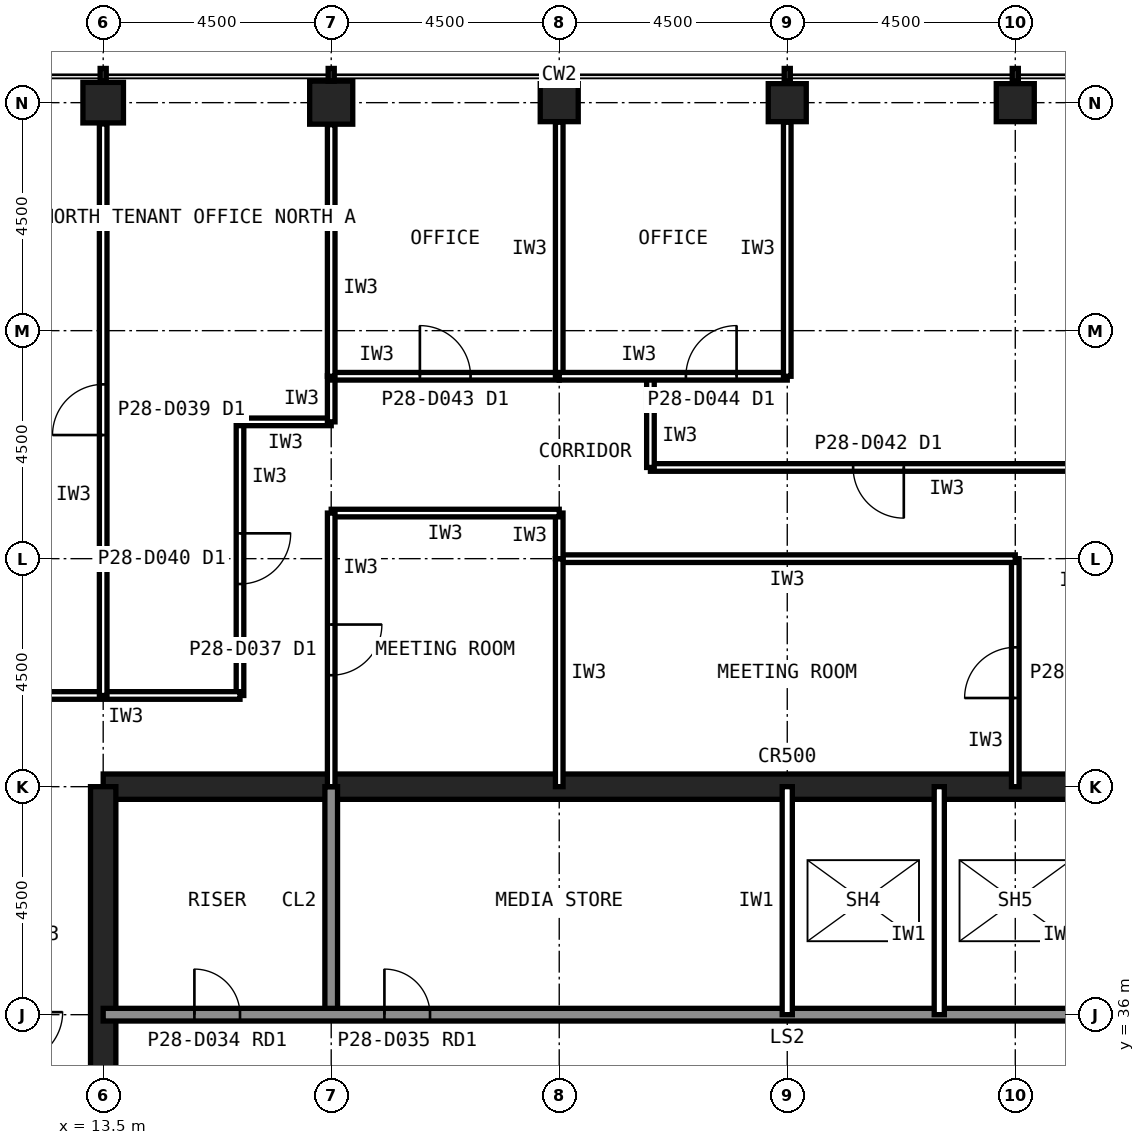
"""IFC4 building model, lengths in metres.
Left out: names, types, materials, properties, quantities, classifications, styles, units other than length and angle.
Written with IfcOpenShell. Run it as: python <this file> out.ifc"""

import sys

from ifc_helpers import new_model, si_unit, direction, frame, frame_2d, origin, origin_2d, place, context, subcontext, project, spatial, rectangle, hollow_rectangle, extrude, element, fill, save


model = new_model("IFC4")
c1 = context("Model", 3, precision=1e-05, world=origin(), true_north=direction((0.0, 1.0)))
c2 = subcontext(c1, "Body", "Model", "MODEL_VIEW")
j1 = project(units=[si_unit("LENGTHUNIT", "METRE"), si_unit("PLANEANGLEUNIT", "RADIAN")], contexts=[c1])
p1 = place(None, origin())
s1 = spatial("IfcSite", under=j1, at=p1, CompositionType="ELEMENT")
p2 = place(p1, origin())
s2 = spatial("IfcBuilding", under=s1, at=p2, CompositionType="ELEMENT")
p3 = place(p2, frame((0.0, 0.0, 119.6)))
s3 = spatial("IfcBuildingStorey", under=s2, at=p3, CompositionType="ELEMENT", Elevation=119.6)
for number, where, z_axis, x_axis in (
    (1, (31.5, 54.0, 0.0), (0.0, 0.0, 1.0), (1.0, 0.0, 0.0)),
    (2, (27.0, 54.0, 0.0), (0.0, 0.0, 1.0), (1.0, 0.0, 0.0)),
    (3, (22.5, 54.0, 0.0), (0.0, 0.0, 1.0), (1.0, 0.0, 0.0)),
):
    element("IfcColumn", number, at=place(p3, frame(where, z_axis=z_axis, x_axis=x_axis)), inside=s3, PredefinedType="COLUMN", context=c2, shape_type="SweptSolid", body=[
        extrude(hollow_rectangle(XDim=0.75, YDim=0.75, WallThickness=0.04, at=origin_2d()), origin(), (0.0, 0.0, 1.0), 4.0),
    ])
p4 = place(p3, frame((18.0, 54.0, 0.0), z_axis=(0.0, 0.0, 1.0), x_axis=(1.0, 0.0, 0.0)))
e4 = element("IfcColumn", 4, at=p4, inside=s3, PredefinedType="COLUMN", context=c2, shape_type="SweptSolid", body=[
    extrude(hollow_rectangle(XDim=0.85, YDim=0.85, WallThickness=0.05, at=origin_2d()), origin(), (0.0, 0.0, 1.0), 4.0),
])
p5 = place(p3, frame((13.5, 54.0, 0.0), z_axis=(0.0, 0.0, 1.0), x_axis=(1.0, 0.0, 0.0)))
e5 = element("IfcColumn", 5, at=p5, inside=s3, PredefinedType="COLUMN", context=c2, shape_type="SweptSolid", body=[
    extrude(hollow_rectangle(XDim=0.8, YDim=0.8, WallThickness=0.045, at=origin_2d()), origin(), (0.0, 0.0, 1.0), 4.0),
])
p6 = place(p3, frame((40.5, 40.5, 0.0), z_axis=(0.0, 0.0, 1.0), x_axis=(-1.0, 0.0, 0.0)))
e6 = element("IfcWall", 6, at=p6, inside=s3, PredefinedType="SHEAR", context=c2, shape_type="SweptSolid", body=[
    extrude(rectangle(XDim=27.0, YDim=0.5, at=frame_2d((13.5, 0.0))), origin(), (0.0, 0.0, 1.0), 4.0),
])
p7 = place(p3, frame((13.5, 40.5, 0.0), z_axis=(0.0, 0.0, 1.0), x_axis=(0.0, -1.0, 0.0)))
e7 = element("IfcWall", 7, at=p7, inside=s3, PredefinedType="SHEAR", context=c2, shape_type="SweptSolid", body=[
    extrude(rectangle(XDim=27.0, YDim=0.5, at=frame_2d((13.5, 0.0))), origin(), (0.0, 0.0, 1.0), 4.0),
])
p8 = place(p7, frame((19.65, 0.0, 0.0)))
e8 = element("IfcOpeningElement", 8, at=p8, cuts=e7, PredefinedType="OPENING", context=c2, shape_type="SweptSolid", body=[
    extrude(rectangle(XDim=1.2, YDim=2.1, at=frame_2d((0.6, 1.05))), frame((0.0, 0.26, 0.0), z_axis=(0.0, -1.0, 0.0), x_axis=(1.0, 0.0, 0.0)), (0.0, 0.0, 1.0), 0.52),
])
p9 = place(p7, frame((5.85, 0.0, 0.0)))
e9 = element("IfcOpeningElement", 9, at=p9, cuts=e7, PredefinedType="OPENING", context=c2, shape_type="SweptSolid", body=[
    extrude(rectangle(XDim=1.8, YDim=2.1, at=frame_2d((0.9, 1.05))), frame((0.0, 0.26, 0.0), z_axis=(0.0, -1.0, 0.0), x_axis=(1.0, 0.0, 0.0)), (0.0, 0.0, 1.0), 0.52),
])
p10 = place(p3, frame((18.0, 36.0, 0.0), z_axis=(0.0, 0.0, 1.0), x_axis=(0.0, 1.0, 0.0)))
e10 = element("IfcWall", 10, at=p10, inside=s3, PredefinedType="SOLIDWALL", context=c2, shape_type="SweptSolid", body=[
    extrude(rectangle(XDim=4.5, YDim=0.25, at=frame_2d((2.25, 0.0))), origin(), (0.0, 0.0, 1.0), 3.84),
])
p11 = place(p3, frame((13.5, 36.0, 0.0), z_axis=(0.0, 0.0, 1.0), x_axis=(1.0, 0.0, 0.0)))
e11 = element("IfcWall", 11, at=p11, inside=s3, PredefinedType="SOLIDWALL", context=c2, shape_type="SweptSolid", body=[
    extrude(rectangle(XDim=27.0, YDim=0.25, at=frame_2d((13.5, 0.0))), origin(), (0.0, 0.0, 1.0), 3.84),
])
p12 = place(p11, frame((1.8, 0.0, 0.0)))
e12 = element("IfcOpeningElement", 12, at=p12, cuts=e11, PredefinedType="OPENING", context=c2, shape_type="SweptSolid", body=[
    extrude(rectangle(XDim=0.9, YDim=2.1, at=frame_2d((0.45, 1.05))), frame((0.0, 0.135, 0.0), z_axis=(0.0, -1.0, 0.0), x_axis=(1.0, 0.0, 0.0)), (0.0, 0.0, 1.0), 0.27),
])
p13 = place(p11, frame((5.55, 0.0, 0.0)))
e13 = element("IfcOpeningElement", 13, at=p13, cuts=e11, PredefinedType="OPENING", context=c2, shape_type="SweptSolid", body=[
    extrude(rectangle(XDim=0.9, YDim=2.1, at=frame_2d((0.45, 1.05))), frame((0.0, 0.135, 0.0), z_axis=(0.0, -1.0, 0.0), x_axis=(1.0, 0.0, 0.0)), (0.0, 0.0, 1.0), 0.27),
])
p14 = place(p11, frame((8.55, 0.0, 0.0)))
e14 = element("IfcOpeningElement", 14, at=p14, cuts=e11, PredefinedType="OPENING", context=c2, shape_type="SweptSolid", body=[
    extrude(rectangle(XDim=0.9, YDim=2.1, at=frame_2d((0.45, 1.05))), frame((0.0, 0.135, 0.0), z_axis=(0.0, -1.0, 0.0), x_axis=(1.0, 0.0, 0.0)), (0.0, 0.0, 1.0), 0.27),
])
p15 = place(p11, frame((24.1, 0.0, 0.0)))
e15 = element("IfcOpeningElement", 15, at=p15, cuts=e11, PredefinedType="OPENING", context=c2, shape_type="SweptSolid", body=[
    extrude(rectangle(XDim=1.3, YDim=2.2, at=frame_2d((0.65, 1.1))), frame((0.0, 0.135, 0.0), z_axis=(0.0, -1.0, 0.0), x_axis=(1.0, 0.0, 0.0)), (0.0, 0.0, 1.0), 0.27),
])
for number, where, z_axis, x_axis in (
    (16, (21.0, 36.0, 0.0), (0.0, 0.0, 1.0), (0.0, 1.0, 0.0)),
    (17, (27.0, 36.0, 0.0), (0.0, 0.0, 1.0), (0.0, 1.0, 0.0)),
    (18, (30.0, 36.0, 0.0), (0.0, 0.0, 1.0), (0.0, 1.0, 0.0)),
):
    element("IfcWall", number, at=place(p3, frame(where, z_axis=z_axis, x_axis=x_axis)), inside=s3, PredefinedType="PARTITIONING", context=c2, shape_type="SweptSolid", body=[
        extrude(rectangle(XDim=4.5, YDim=0.2, at=frame_2d((2.25, 0.0))), origin(), (0.0, 0.0, 1.0), 3.84),
    ])
p16 = place(p3, frame((16.2, 47.7, 0.0), z_axis=(0.0, 0.0, 1.0), x_axis=(0.0, -1.0, 0.0)))
e19 = element("IfcWall", 19, at=p16, inside=s3, PredefinedType="PARTITIONING", context=c2, shape_type="SweptSolid", body=[
    extrude(rectangle(XDim=5.4, YDim=0.15, at=frame_2d((2.7, 0.0))), origin(), (0.0, 0.0, 1.0), 3.84),
])
p17 = place(p16, frame((2.2, 0.0, 0.0)))
e20 = element("IfcOpeningElement", 20, at=p17, cuts=e19, PredefinedType="OPENING", context=c2, shape_type="SweptSolid", body=[
    extrude(rectangle(XDim=1.0, YDim=2.1, at=frame_2d((0.5, 1.05))), frame((0.0, 0.085, 0.0), z_axis=(0.0, -1.0, 0.0), x_axis=(1.0, 0.0, 0.0)), (0.0, 0.0, 1.0), 0.17),
])
p18 = place(p3, frame((16.2, 42.3, 0.0), z_axis=(0.0, 0.0, 1.0), x_axis=(-1.0, 0.0, 0.0)))
e21 = element("IfcWall", 21, at=p18, inside=s3, PredefinedType="PARTITIONING", context=c2, shape_type="SweptSolid", body=[
    extrude(rectangle(XDim=4.5, YDim=0.15, at=frame_2d((2.25, 0.0))), origin(), (0.0, 0.0, 1.0), 3.84),
])
p19 = place(p3, frame((18.0, 47.7, 0.0), z_axis=(0.0, 0.0, 1.0), x_axis=(-1.0, 0.0, 0.0)))
e22 = element("IfcWall", 22, at=p19, inside=s3, PredefinedType="PARTITIONING", context=c2, shape_type="SweptSolid", body=[
    extrude(rectangle(XDim=1.8, YDim=0.15, at=frame_2d((0.9, 0.0))), origin(), (0.0, 0.0, 1.0), 3.84),
])
p20 = place(p3, frame((18.0, 48.61, 0.0), z_axis=(0.0, 0.0, 1.0), x_axis=(0.0, -1.0, 0.0)))
e23 = element("IfcWall", 23, at=p20, inside=s3, PredefinedType="PARTITIONING", context=c2, shape_type="SweptSolid", body=[
    extrude(rectangle(XDim=0.91, YDim=0.15, at=frame_2d((0.455, 0.0))), origin(), (0.0, 0.0, 1.0), 2.989),
])
p21 = place(p3, frame((33.3, 46.8, 0.0), z_axis=(0.0, 0.0, 1.0), x_axis=(-1.0, 0.0, 0.0)))
e24 = element("IfcWall", 24, at=p21, inside=s3, PredefinedType="PARTITIONING", context=c2, shape_type="SweptSolid", body=[
    extrude(rectangle(XDim=9.0, YDim=0.15, at=frame_2d((4.5, 0.0))), origin(), (0.0, 0.0, 1.0), 3.84),
])
p22 = place(p21, frame((4.0, 0.0, 0.0)))
e25 = element("IfcOpeningElement", 25, at=p22, cuts=e24, PredefinedType="OPENING", context=c2, shape_type="SweptSolid", body=[
    extrude(rectangle(XDim=1.0, YDim=2.1, at=frame_2d((0.5, 1.05))), frame((0.0, 0.085, 0.0), z_axis=(0.0, -1.0, 0.0), x_axis=(1.0, 0.0, 0.0)), (0.0, 0.0, 1.0), 0.17),
])
p23 = place(p3, frame((24.3, 46.8, 0.0), z_axis=(0.0, 0.0, 1.0), x_axis=(0.0, 1.0, 0.0)))
e26 = element("IfcWall", 26, at=p23, inside=s3, PredefinedType="PARTITIONING", context=c2, shape_type="SweptSolid", body=[
    extrude(rectangle(XDim=1.8, YDim=0.15, at=frame_2d((0.9, 0.0))), origin(), (0.0, 0.0, 1.0), 3.84),
])
p24 = place(p3, frame((31.5, 40.5, 0.0), z_axis=(0.0, 0.0, 1.0), x_axis=(0.0, 1.0, 0.0)))
e27 = element("IfcWall", 27, at=p24, inside=s3, PredefinedType="PARTITIONING", context=c2, shape_type="SweptSolid", body=[
    extrude(rectangle(XDim=4.5, YDim=0.15, at=frame_2d((2.25, 0.0))), origin(), (0.0, 0.0, 1.0), 2.989),
])
p25 = place(p24, frame((1.75, 0.0, 0.0)))
e28 = element("IfcOpeningElement", 28, at=p25, cuts=e27, PredefinedType="OPENING", context=c2, shape_type="SweptSolid", body=[
    extrude(rectangle(XDim=1.0, YDim=2.1, at=frame_2d((0.5, 1.05))), frame((0.0, 0.085, 0.0), z_axis=(0.0, -1.0, 0.0), x_axis=(1.0, 0.0, 0.0)), (0.0, 0.0, 1.0), 0.17),
])
p26 = place(p3, frame((31.5, 45.0, 0.0), z_axis=(0.0, 0.0, 1.0), x_axis=(-1.0, 0.0, 0.0)))
e29 = element("IfcWall", 29, at=p26, inside=s3, PredefinedType="PARTITIONING", context=c2, shape_type="SweptSolid", body=[
    extrude(rectangle(XDim=9.0, YDim=0.15, at=frame_2d((4.5, 0.0))), origin(), (0.0, 0.0, 1.0), 3.84),
])
p27 = place(p3, frame((22.5, 45.0, 0.0), z_axis=(0.0, 0.0, 1.0), x_axis=(0.0, -1.0, 0.0)))
e30 = element("IfcWall", 30, at=p27, inside=s3, PredefinedType="PARTITIONING", context=c2, shape_type="SweptSolid", body=[
    extrude(rectangle(XDim=4.5, YDim=0.15, at=frame_2d((2.25, 0.0))), origin(), (0.0, 0.0, 1.0), 2.989),
])
p28 = place(p3, frame((18.0, 48.6, 0.0), z_axis=(0.0, 0.0, 1.0), x_axis=(1.0, 0.0, 0.0)))
e31 = element("IfcWall", 31, at=p28, inside=s3, PredefinedType="PARTITIONING", context=c2, shape_type="SweptSolid", body=[
    extrude(rectangle(XDim=4.5, YDim=0.15, at=frame_2d((2.25, 0.0))), origin(), (0.0, 0.0, 1.0), 3.84),
])
p29 = place(p28, frame((1.75, 0.0, 0.0)))
e32 = element("IfcOpeningElement", 32, at=p29, cuts=e31, PredefinedType="OPENING", context=c2, shape_type="SweptSolid", body=[
    extrude(rectangle(XDim=1.0, YDim=2.1, at=frame_2d((0.5, 1.05))), frame((0.0, 0.085, 0.0), z_axis=(0.0, -1.0, 0.0), x_axis=(1.0, 0.0, 0.0)), (0.0, 0.0, 1.0), 0.17),
])
p30 = place(p3, frame((22.5, 48.6, 0.0), z_axis=(0.0, 0.0, 1.0), x_axis=(0.0, 1.0, 0.0)))
e33 = element("IfcWall", 33, at=p30, inside=s3, PredefinedType="PARTITIONING", context=c2, shape_type="SweptSolid", body=[
    extrude(rectangle(XDim=5.015, YDim=0.15, at=frame_2d((2.507, 0.0))), origin(), (0.0, 0.0, 1.0), 2.989),
])
p31 = place(p3, frame((18.0, 53.565, 0.0), z_axis=(0.0, 0.0, 1.0), x_axis=(0.0, -1.0, 0.0)))
e34 = element("IfcWall", 34, at=p31, inside=s3, PredefinedType="PARTITIONING", context=c2, shape_type="SweptSolid", body=[
    extrude(rectangle(XDim=4.965, YDim=0.15, at=frame_2d((2.482, 0.0))), origin(), (0.0, 0.0, 1.0), 2.989),
])
p32 = place(p3, frame((22.5, 48.6, 0.0), z_axis=(0.0, 0.0, 1.0), x_axis=(1.0, 0.0, 0.0)))
e35 = element("IfcWall", 35, at=p32, inside=s3, PredefinedType="PARTITIONING", context=c2, shape_type="SweptSolid", body=[
    extrude(rectangle(XDim=4.5, YDim=0.15, at=frame_2d((2.25, 0.0))), origin(), (0.0, 0.0, 1.0), 3.84),
])
p33 = place(p32, frame((2.5, 0.0, 0.0)))
e36 = element("IfcOpeningElement", 36, at=p33, cuts=e35, PredefinedType="OPENING", context=c2, shape_type="SweptSolid", body=[
    extrude(rectangle(XDim=1.0, YDim=2.1, at=frame_2d((0.5, 1.05))), frame((0.0, 0.085, 0.0), z_axis=(0.0, -1.0, 0.0), x_axis=(1.0, 0.0, 0.0)), (0.0, 0.0, 1.0), 0.17),
])
p34 = place(p3, frame((27.0, 48.6, 0.0), z_axis=(0.0, 0.0, 1.0), x_axis=(0.0, 1.0, 0.0)))
e37 = element("IfcWall", 37, at=p34, inside=s3, PredefinedType="PARTITIONING", context=c2, shape_type="SweptSolid", body=[
    extrude(rectangle(XDim=5.015, YDim=0.15, at=frame_2d((2.507, 0.0))), origin(), (0.0, 0.0, 1.0), 2.989),
])
p35 = place(p3, frame((22.5, 45.0, 0.0), z_axis=(0.0, 0.0, 1.0), x_axis=(0.0, 1.0, 0.0)))
e38 = element("IfcWall", 38, at=p35, inside=s3, PredefinedType="PARTITIONING", context=c2, shape_type="SweptSolid", body=[
    extrude(rectangle(XDim=0.9, YDim=0.15, at=frame_2d((0.45, 0.0))), origin(), (0.0, 0.0, 1.0), 2.989),
])
p36 = place(p3, frame((22.5, 45.9, 0.0), z_axis=(0.0, 0.0, 1.0), x_axis=(-1.0, 0.0, 0.0)))
e39 = element("IfcWall", 39, at=p36, inside=s3, PredefinedType="PARTITIONING", context=c2, shape_type="SweptSolid", body=[
    extrude(rectangle(XDim=4.5, YDim=0.15, at=frame_2d((2.25, 0.0))), origin(), (0.0, 0.0, 1.0), 3.84),
])
p37 = place(p3, frame((18.0, 45.9, 0.0), z_axis=(0.0, 0.0, 1.0), x_axis=(0.0, -1.0, 0.0)))
e40 = element("IfcWall", 40, at=p37, inside=s3, PredefinedType="PARTITIONING", context=c2, shape_type="SweptSolid", body=[
    extrude(rectangle(XDim=5.4, YDim=0.15, at=frame_2d((2.7, 0.0))), origin(), (0.0, 0.0, 1.0), 2.989),
])
p38 = place(p37, frame((2.2, 0.0, 0.0)))
e41 = element("IfcOpeningElement", 41, at=p38, cuts=e40, PredefinedType="OPENING", context=c2, shape_type="SweptSolid", body=[
    extrude(rectangle(XDim=1.0, YDim=2.1, at=frame_2d((0.5, 1.05))), frame((0.0, 0.085, 0.0), z_axis=(0.0, -1.0, 0.0), x_axis=(1.0, 0.0, 0.0)), (0.0, 0.0, 1.0), 0.17),
])
p39 = place(p3, frame((13.5, 42.3, 0.0), z_axis=(0.0, 0.0, 1.0), x_axis=(0.0, 1.0, 0.0)))
e42 = element("IfcWall", 42, at=p39, inside=s3, PredefinedType="PARTITIONING", context=c2, shape_type="SweptSolid", body=[
    extrude(rectangle(XDim=11.28, YDim=0.15, at=frame_2d((5.64, 0.0))), origin(), (0.0, 0.0, 1.0), 2.989),
])
p40 = place(p39, frame((5.14, 0.0, 0.0)))
e43 = element("IfcOpeningElement", 43, at=p40, cuts=e42, PredefinedType="OPENING", context=c2, shape_type="SweptSolid", body=[
    extrude(rectangle(XDim=1.0, YDim=2.1, at=frame_2d((0.5, 1.05))), frame((0.0, 0.085, 0.0), z_axis=(0.0, -1.0, 0.0), x_axis=(1.0, 0.0, 0.0)), (0.0, 0.0, 1.0), 0.17),
])
p41 = place(p12, origin())
e44 = element("IfcDoor", 44, at=p41, inside=s3, OperationType="SINGLE_SWING_LEFT", PredefinedType="DOOR", context=c2, shape_type="SweptSolid", body=[
    extrude(rectangle(XDim=0.9, YDim=2.1, at=frame_2d((0.45, 1.05))), frame((0.0, 0.025, 0.0), z_axis=(0.0, -1.0, 0.0), x_axis=(1.0, 0.0, 0.0)), (0.0, 0.0, 1.0), 0.05),
])
fill(e12, e44)
p42 = place(p13, origin())
e45 = element("IfcDoor", 45, at=p42, inside=s3, OperationType="SINGLE_SWING_LEFT", PredefinedType="DOOR", context=c2, shape_type="SweptSolid", body=[
    extrude(rectangle(XDim=0.9, YDim=2.1, at=frame_2d((0.45, 1.05))), frame((0.0, 0.025, 0.0), z_axis=(0.0, -1.0, 0.0), x_axis=(1.0, 0.0, 0.0)), (0.0, 0.0, 1.0), 0.05),
])
fill(e13, e45)
p43 = place(p14, origin())
e46 = element("IfcDoor", 46, at=p43, inside=s3, OperationType="SINGLE_SWING_LEFT", PredefinedType="DOOR", context=c2, shape_type="SweptSolid", body=[
    extrude(rectangle(XDim=0.9, YDim=2.1, at=frame_2d((0.45, 1.05))), frame((0.0, 0.025, 0.0), z_axis=(0.0, -1.0, 0.0), x_axis=(1.0, 0.0, 0.0)), (0.0, 0.0, 1.0), 0.05),
])
fill(e14, e46)
p44 = place(p17, origin())
e47 = element("IfcDoor", 47, at=p44, inside=s3, OperationType="SINGLE_SWING_LEFT", PredefinedType="DOOR", context=c2, shape_type="SweptSolid", body=[
    extrude(rectangle(XDim=1.0, YDim=2.1, at=frame_2d((0.5, 1.05))), frame((0.0, 0.025, 0.0), z_axis=(0.0, -1.0, 0.0), x_axis=(1.0, 0.0, 0.0)), (0.0, 0.0, 1.0), 0.05),
])
fill(e20, e47)
p45 = place(p22, origin())
e48 = element("IfcDoor", 48, at=p45, inside=s3, OperationType="SINGLE_SWING_LEFT", PredefinedType="DOOR", context=c2, shape_type="SweptSolid", body=[
    extrude(rectangle(XDim=1.0, YDim=2.1, at=frame_2d((0.5, 1.05))), frame((0.0, 0.025, 0.0), z_axis=(0.0, -1.0, 0.0), x_axis=(1.0, 0.0, 0.0)), (0.0, 0.0, 1.0), 0.05),
])
fill(e25, e48)
p46 = place(p25, origin())
e49 = element("IfcDoor", 49, at=p46, inside=s3, OperationType="SINGLE_SWING_LEFT", PredefinedType="DOOR", context=c2, shape_type="SweptSolid", body=[
    extrude(rectangle(XDim=1.0, YDim=2.1, at=frame_2d((0.5, 1.05))), frame((0.0, 0.025, 0.0), z_axis=(0.0, -1.0, 0.0), x_axis=(1.0, 0.0, 0.0)), (0.0, 0.0, 1.0), 0.05),
])
fill(e28, e49)
p47 = place(p29, origin())
e50 = element("IfcDoor", 50, at=p47, inside=s3, OperationType="SINGLE_SWING_LEFT", PredefinedType="DOOR", context=c2, shape_type="SweptSolid", body=[
    extrude(rectangle(XDim=1.0, YDim=2.1, at=frame_2d((0.5, 1.05))), frame((0.0, 0.025, 0.0), z_axis=(0.0, -1.0, 0.0), x_axis=(1.0, 0.0, 0.0)), (0.0, 0.0, 1.0), 0.05),
])
fill(e32, e50)
p48 = place(p33, origin())
e51 = element("IfcDoor", 51, at=p48, inside=s3, OperationType="SINGLE_SWING_RIGHT", PredefinedType="DOOR", context=c2, shape_type="SweptSolid", body=[
    extrude(rectangle(XDim=1.0, YDim=2.1, at=frame_2d((0.5, 1.05))), frame((0.0, 0.025, 0.0), z_axis=(0.0, -1.0, 0.0), x_axis=(1.0, 0.0, 0.0)), (0.0, 0.0, 1.0), 0.05),
])
fill(e36, e51)
p49 = place(p38, origin())
e52 = element("IfcDoor", 52, at=p49, inside=s3, OperationType="SINGLE_SWING_LEFT", PredefinedType="DOOR", context=c2, shape_type="SweptSolid", body=[
    extrude(rectangle(XDim=1.0, YDim=2.1, at=frame_2d((0.5, 1.05))), frame((0.0, 0.025, 0.0), z_axis=(0.0, -1.0, 0.0), x_axis=(1.0, 0.0, 0.0)), (0.0, 0.0, 1.0), 0.05),
])
fill(e41, e52)
p50 = place(p40, origin())
e53 = element("IfcDoor", 53, at=p50, inside=s3, OperationType="SINGLE_SWING_LEFT", PredefinedType="DOOR", context=c2, shape_type="SweptSolid", body=[
    extrude(rectangle(XDim=1.0, YDim=2.1, at=frame_2d((0.5, 1.05))), frame((0.0, 0.025, 0.0), z_axis=(0.0, -1.0, 0.0), x_axis=(1.0, 0.0, 0.0)), (0.0, 0.0, 1.0), 0.05),
])
fill(e43, e53)
save(model, sys.argv[1])
